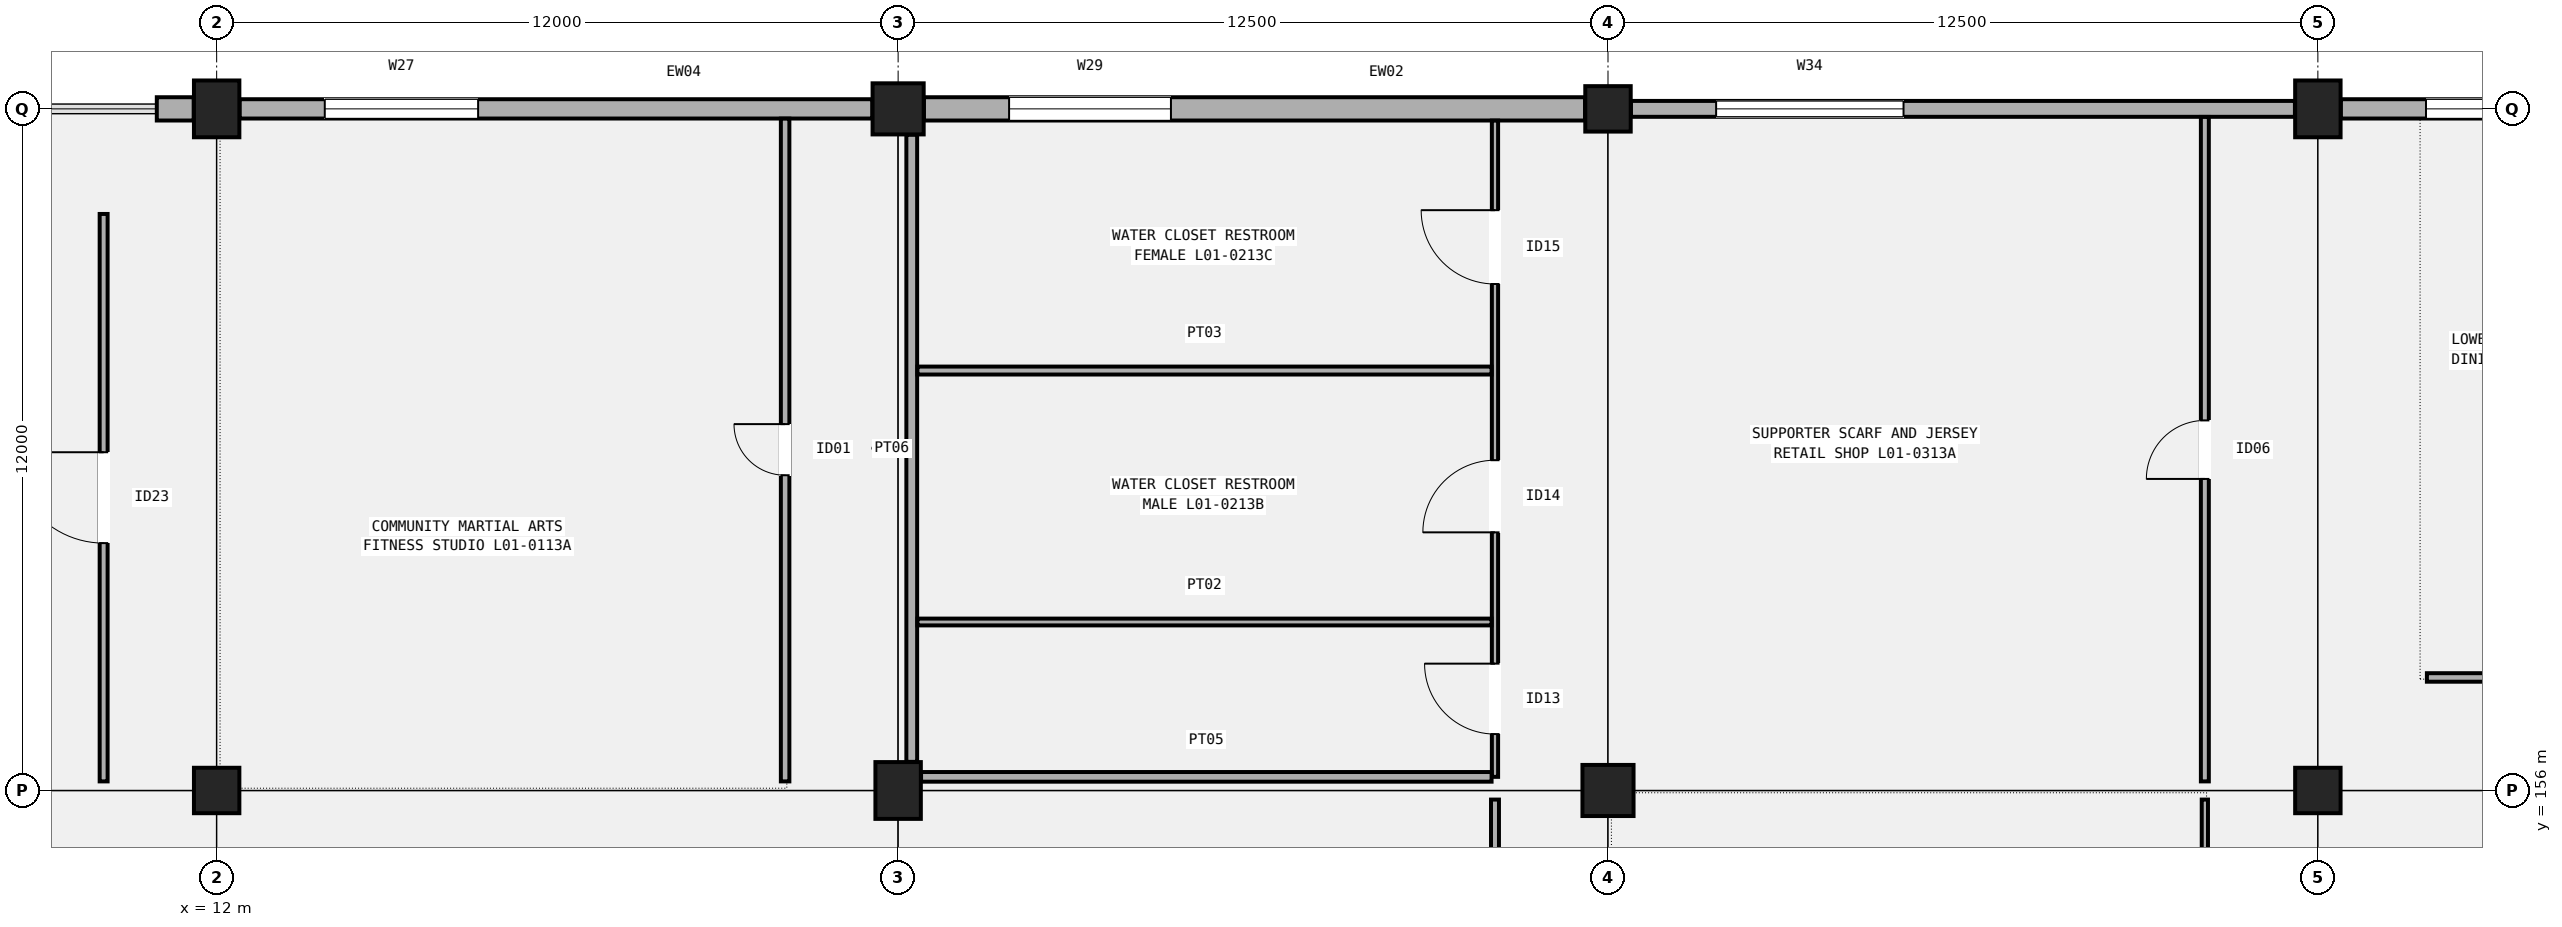
"""IFC4 building model, lengths in metres.
Left out: names, types, materials, properties, quantities, classifications, styles, units other than length and angle.
Written with IfcOpenShell. Run it as: python <this file> out.ifc"""

import sys

from ifc_helpers import new_model, si_unit, direction, frame, frame_2d, origin, origin_2d, place, context, subcontext, project, spatial, rectangle, extrude, element, fill, save


model = new_model("IFC4")
c1 = context("Model", 3, precision=1e-05, world=origin(), true_north=direction((0.0, 1.0)))
c2 = subcontext(c1, "Body", "Model", "MODEL_VIEW")
j1 = project(units=[si_unit("LENGTHUNIT", "METRE"), si_unit("PLANEANGLEUNIT", "RADIAN")], contexts=[c1])
p1 = place(None, origin())
s1 = spatial("IfcSite", under=j1, at=p1, CompositionType="ELEMENT")
p2 = place(p1, origin())
s2 = spatial("IfcBuilding", under=s1, at=p2, CompositionType="ELEMENT")
p3 = place(p2, frame((0.0, 0.0, 5.4)))
s3 = spatial("IfcBuildingStorey", under=s2, at=p3, CompositionType="ELEMENT", Elevation=5.4)
p4 = place(p3, frame((12.0, 156.0, 0.0), z_axis=(0.0, 0.0, 1.0), x_axis=(1.0, 0.0, 0.0)))
e1 = element("IfcColumn", 1, at=p4, inside=s3, PredefinedType="COLUMN", context=c2, shape_type="SweptSolid", body=[
    extrude(rectangle(XDim=0.8, YDim=0.8, at=origin_2d()), origin(), (0.0, 0.0, 1.0), 4.8),
])
for number, where, z_axis, x_axis in (
    (2, (12.0, 168.0, 0.0), (0.0, 0.0, 1.0), (1.0, 0.0, 0.0)),
    (3, (24.0, 156.0, 0.0), (0.0, 0.0, 1.0), (1.0, 0.0, 0.0)),
):
    element("IfcColumn", number, at=place(p3, frame(where, z_axis=z_axis, x_axis=x_axis)), inside=s3, PredefinedType="COLUMN", context=c2, shape_type="SweptSolid", body=[
        extrude(rectangle(XDim=0.8, YDim=1.0, at=origin_2d()), origin(), (0.0, 0.0, 1.0), 4.8),
    ])
for number, where, z_axis, x_axis in (
    (4, (24.0, 168.0, 0.0), (0.0, 0.0, 1.0), (1.0, 0.0, 0.0)),
    (5, (36.5, 156.0, 0.0), (0.0, 0.0, 1.0), (1.0, 0.0, 0.0)),
):
    element("IfcColumn", number, at=place(p3, frame(where, z_axis=z_axis, x_axis=x_axis)), inside=s3, PredefinedType="COLUMN", context=c2, shape_type="SweptSolid", body=[
        extrude(rectangle(XDim=0.9, YDim=0.9, at=origin_2d()), origin(), (0.0, 0.0, 1.0), 4.8),
    ])
for number, where, z_axis, x_axis in (
    (6, (36.5, 168.0, 0.0), (0.0, 0.0, 1.0), (1.0, 0.0, 0.0)),
    (7, (49.0, 156.0, 0.0), (0.0, 0.0, 1.0), (1.0, 0.0, 0.0)),
):
    element("IfcColumn", number, at=place(p3, frame(where, z_axis=z_axis, x_axis=x_axis)), inside=s3, PredefinedType="COLUMN", context=c2, shape_type="SweptSolid", body=[
        extrude(rectangle(XDim=0.8, YDim=0.8, at=origin_2d()), origin(), (0.0, 0.0, 1.0), 4.8),
    ])
p5 = place(p3, frame((49.0, 168.0, 0.0), z_axis=(0.0, 0.0, 1.0), x_axis=(1.0, 0.0, 0.0)))
e8 = element("IfcColumn", 8, at=p5, inside=s3, PredefinedType="COLUMN", context=c2, shape_type="SweptSolid", body=[
    extrude(rectangle(XDim=0.8, YDim=1.0, at=origin_2d()), origin(), (0.0, 0.0, 1.0), 4.8),
])
p6 = place(p3, frame((10.946, 168.0, 0.0), z_axis=(0.0, 0.0, 1.0), x_axis=(1.0, 0.0, 0.0)))
e9 = element("IfcWall", 9, at=p6, inside=s3, PredefinedType="SOLIDWALL", context=c2, shape_type="SweptSolid", body=[
    extrude(rectangle(XDim=0.65, YDim=0.41, at=frame_2d((0.325, 0.0))), origin(), (0.0, 0.0, 1.0), 4.15),
])
p7 = place(p3, frame((12.404, 168.0, 0.0), z_axis=(0.0, 0.0, 1.0), x_axis=(1.0, 0.0, 0.0)))
e10 = element("IfcWall", 10, at=p7, inside=s3, PredefinedType="SOLIDWALL", context=c2, shape_type="SweptSolid", body=[
    extrude(rectangle(XDim=11.142, YDim=0.34, at=frame_2d((5.571, 0.0))), origin(), (0.0, 0.0, 1.0), 4.2),
])
p8 = place(p7, frame((1.5, 0.0, 0.95)))
e11 = element("IfcOpeningElement", 11, at=p8, cuts=e10, PredefinedType="OPENING", context=c2, shape_type="SweptSolid", body=[
    extrude(rectangle(XDim=2.7, YDim=1.75, at=frame_2d((1.35, 0.875))), frame((0.0, 0.18, 0.0), z_axis=(0.0, -1.0, 0.0), x_axis=(1.0, 0.0, 0.0)), (0.0, 0.0, 1.0), 0.36),
])
p9 = place(p3, frame((24.454, 168.0, 0.0), z_axis=(0.0, 0.0, 1.0), x_axis=(1.0, 0.0, 0.0)))
e12 = element("IfcWall", 12, at=p9, inside=s3, PredefinedType="SOLIDWALL", context=c2, shape_type="SweptSolid", body=[
    extrude(rectangle(XDim=11.642, YDim=0.41, at=frame_2d((5.821, 0.0))), origin(), (0.0, 0.0, 1.0), 4.15),
])
p10 = place(p9, frame((1.5, 0.0, 0.95)))
e13 = element("IfcOpeningElement", 13, at=p10, cuts=e12, PredefinedType="OPENING", context=c2, shape_type="SweptSolid", body=[
    extrude(rectangle(XDim=2.85, YDim=2.0, at=frame_2d((1.425, 1.0))), frame((0.0, 0.215, 0.0), z_axis=(0.0, -1.0, 0.0), x_axis=(1.0, 0.0, 0.0)), (0.0, 0.0, 1.0), 0.43),
])
p11 = place(p3, frame((36.904, 168.0, 0.0), z_axis=(0.0, 0.0, 1.0), x_axis=(1.0, 0.0, 0.0)))
e14 = element("IfcWall", 14, at=p11, inside=s3, PredefinedType="SOLIDWALL", context=c2, shape_type="SweptSolid", body=[
    extrude(rectangle(XDim=11.692, YDim=0.28, at=frame_2d((5.846, 0.0))), origin(), (0.0, 0.0, 1.0), 4.2),
])
p12 = place(p11, frame((1.5, 0.0, 0.95)))
e15 = element("IfcOpeningElement", 15, at=p12, cuts=e14, PredefinedType="OPENING", context=c2, shape_type="SweptSolid", body=[
    extrude(rectangle(XDim=3.3, YDim=2.25, at=frame_2d((1.65, 1.125))), frame((0.0, 0.15, 0.0), z_axis=(0.0, -1.0, 0.0), x_axis=(1.0, 0.0, 0.0)), (0.0, 0.0, 1.0), 0.3),
])
p13 = place(p3, frame((49.404, 168.0, 0.0), z_axis=(0.0, 0.0, 1.0), x_axis=(1.0, 0.0, 0.0)))
e16 = element("IfcWall", 16, at=p13, inside=s3, PredefinedType="SOLIDWALL", context=c2, shape_type="SweptSolid", body=[
    extrude(rectangle(XDim=11.642, YDim=0.34, at=frame_2d((5.821, 0.0))), origin(), (0.0, 0.0, 1.0), 4.15),
])
p14 = place(p13, frame((1.5, 0.0, 0.95)))
e17 = element("IfcOpeningElement", 17, at=p14, cuts=e16, PredefinedType="OPENING", context=c2, shape_type="SweptSolid", body=[
    extrude(rectangle(XDim=3.6, YDim=2.15, at=frame_2d((1.8, 1.075))), frame((0.0, 0.18, 0.0), z_axis=(0.0, -1.0, 0.0), x_axis=(1.0, 0.0, 0.0)), (0.0, 0.0, 1.0), 0.36),
])
p15 = place(p3, frame((10.01, 156.16, 0.0), z_axis=(0.0, 0.0, 1.0), x_axis=(0.0, 1.0, 0.0)))
e18 = element("IfcWall", 18, at=p15, inside=s3, PredefinedType="PARTITIONING", context=c2, shape_type="SweptSolid", body=[
    extrude(rectangle(XDim=9.99, YDim=0.14, at=frame_2d((4.995, 0.0))), origin(), (0.0, 0.0, 1.0), 3.92),
])
p16 = place(p15, frame((4.195, 0.0, 0.0)))
e19 = element("IfcOpeningElement", 19, at=p16, cuts=e18, PredefinedType="OPENING", context=c2, shape_type="SweptSolid", body=[
    extrude(rectangle(XDim=1.6, YDim=2.3, at=frame_2d((0.8, 1.15))), frame((0.0, 0.08, 0.0), z_axis=(0.0, -1.0, 0.0), x_axis=(1.0, 0.0, 0.0)), (0.0, 0.0, 1.0), 0.16),
])
p17 = place(p3, frame((22.01, 156.16, 0.0), z_axis=(0.0, 0.0, 1.0), x_axis=(0.0, 1.0, 0.0)))
e20 = element("IfcWall", 20, at=p17, inside=s3, PredefinedType="PARTITIONING", context=c2, shape_type="SweptSolid", body=[
    extrude(rectangle(XDim=11.668, YDim=0.15, at=frame_2d((5.834, 0.0))), origin(), (0.0, 0.0, 1.0), 3.92),
])
p18 = place(p17, frame((5.39, 0.0, 0.0)))
e21 = element("IfcOpeningElement", 21, at=p18, cuts=e20, PredefinedType="OPENING", context=c2, shape_type="SweptSolid", body=[
    extrude(rectangle(XDim=0.9, YDim=2.06, at=frame_2d((0.45, 1.03))), frame((0.0, 0.085, 0.0), z_axis=(0.0, -1.0, 0.0), x_axis=(1.0, 0.0, 0.0)), (0.0, 0.0, 1.0), 0.17),
])
p19 = place(p3, frame((34.51, 145.92, 0.0), z_axis=(0.0, 0.0, 1.0), x_axis=(0.0, 1.0, 0.0)))
e22 = element("IfcWall", 22, at=p19, inside=s3, PredefinedType="PARTITIONING", context=c2, shape_type="SweptSolid", body=[
    extrude(rectangle(XDim=9.92, YDim=0.14, at=frame_2d((4.96, 0.0))), origin(), (0.0, 0.0, 1.0), 3.92),
])
p20 = place(p19, frame((4.355, 0.0, 0.0)))
e23 = element("IfcOpeningElement", 23, at=p20, cuts=e22, PredefinedType="OPENING", context=c2, shape_type="SweptSolid", body=[
    extrude(rectangle(XDim=1.21, YDim=2.18, at=frame_2d((0.605, 1.09))), frame((0.0, 0.08, 0.0), z_axis=(0.0, -1.0, 0.0), x_axis=(1.0, 0.0, 0.0)), (0.0, 0.0, 1.0), 0.16),
])
p21 = place(p3, frame((34.51, 156.24, 0.0), z_axis=(0.0, 0.0, 1.0), x_axis=(0.0, 1.0, 0.0)))
e24 = element("IfcWall", 24, at=p21, inside=s3, PredefinedType="PARTITIONING", context=c2, shape_type="SweptSolid", body=[
    extrude(rectangle(XDim=11.553, YDim=0.11, at=frame_2d((5.776, 0.0))), origin(), (0.0, 0.0, 1.0), 3.92),
])
p22 = place(p21, frame((0.753, 0.0, 0.0)))
e25 = element("IfcOpeningElement", 25, at=p22, cuts=e24, PredefinedType="OPENING", context=c2, shape_type="SweptSolid", body=[
    extrude(rectangle(XDim=1.24, YDim=2.22, at=frame_2d((0.62, 1.11))), frame((0.0, 0.065, 0.0), z_axis=(0.0, -1.0, 0.0), x_axis=(1.0, 0.0, 0.0)), (0.0, 0.0, 1.0), 0.13),
])
p23 = place(p21, frame((4.305, 0.0, 0.0)))
e26 = element("IfcOpeningElement", 26, at=p23, cuts=e24, PredefinedType="OPENING", context=c2, shape_type="SweptSolid", body=[
    extrude(rectangle(XDim=1.27, YDim=2.2, at=frame_2d((0.635, 1.1))), frame((0.0, 0.065, 0.0), z_axis=(0.0, -1.0, 0.0), x_axis=(1.0, 0.0, 0.0)), (0.0, 0.0, 1.0), 0.13),
])
p24 = place(p21, frame((8.677, 0.0, 0.0)))
e27 = element("IfcOpeningElement", 27, at=p24, cuts=e24, PredefinedType="OPENING", context=c2, shape_type="SweptSolid", body=[
    extrude(rectangle(XDim=1.3, YDim=2.24, at=frame_2d((0.65, 1.12))), frame((0.0, 0.065, 0.0), z_axis=(0.0, -1.0, 0.0), x_axis=(1.0, 0.0, 0.0)), (0.0, 0.0, 1.0), 0.13),
])
p25 = place(p3, frame((24.404, 156.24, 0.0), z_axis=(0.0, 0.0, 1.0), x_axis=(1.0, 0.0, 0.0)))
e28 = element("IfcWall", 28, at=p25, inside=s3, PredefinedType="PARTITIONING", context=c2, shape_type="SweptSolid", body=[
    extrude(rectangle(XDim=10.046, YDim=0.17, at=frame_2d((5.023, 0.0))), origin(), (0.0, 0.0, 1.0), 3.71),
])
p26 = place(p3, frame((24.24, 156.504, 0.0), z_axis=(0.0, 0.0, 1.0), x_axis=(0.0, 1.0, 0.0)))
e29 = element("IfcWall", 29, at=p26, inside=s3, PredefinedType="PARTITIONING", context=c2, shape_type="SweptSolid", body=[
    extrude(rectangle(XDim=11.042, YDim=0.19, at=frame_2d((5.521, 0.0))), origin(), (0.0, 0.0, 1.0), 3.71),
])
p27 = place(p3, frame((24.34, 158.966, 0.0), z_axis=(0.0, 0.0, 1.0), x_axis=(1.0, 0.0, 0.0)))
e30 = element("IfcWall", 30, at=p27, inside=s3, PredefinedType="PARTITIONING", context=c2, shape_type="SweptSolid", body=[
    extrude(rectangle(XDim=10.11, YDim=0.12, at=frame_2d((5.055, 0.0))), origin(), (0.0, 0.0, 1.0), 3.92),
])
p28 = place(p3, frame((24.34, 163.393, 0.0), z_axis=(0.0, 0.0, 1.0), x_axis=(1.0, 0.0, 0.0)))
e31 = element("IfcWall", 31, at=p28, inside=s3, PredefinedType="PARTITIONING", context=c2, shape_type="SweptSolid", body=[
    extrude(rectangle(XDim=10.11, YDim=0.14, at=frame_2d((5.055, 0.0))), origin(), (0.0, 0.0, 1.0), 3.92),
])
p29 = place(p3, frame((47.01, 145.92, 0.0), z_axis=(0.0, 0.0, 1.0), x_axis=(0.0, 1.0, 0.0)))
e32 = element("IfcWall", 32, at=p29, inside=s3, PredefinedType="PARTITIONING", context=c2, shape_type="SweptSolid", body=[
    extrude(rectangle(XDim=9.92, YDim=0.11, at=frame_2d((4.96, 0.0))), origin(), (0.0, 0.0, 1.0), 3.92),
])
p30 = place(p29, frame((4.46, 0.0, 0.0)))
e33 = element("IfcOpeningElement", 33, at=p30, cuts=e32, PredefinedType="OPENING", context=c2, shape_type="SweptSolid", body=[
    extrude(rectangle(XDim=1.0, YDim=2.14, at=frame_2d((0.5, 1.07))), frame((0.0, 0.065, 0.0), z_axis=(0.0, -1.0, 0.0), x_axis=(1.0, 0.0, 0.0)), (0.0, 0.0, 1.0), 0.13),
])
p31 = place(p3, frame((47.01, 156.16, 0.0), z_axis=(0.0, 0.0, 1.0), x_axis=(0.0, 1.0, 0.0)))
e34 = element("IfcWall", 34, at=p31, inside=s3, PredefinedType="PARTITIONING", context=c2, shape_type="SweptSolid", body=[
    extrude(rectangle(XDim=11.698, YDim=0.14, at=frame_2d((5.849, 0.0))), origin(), (0.0, 0.0, 1.0), 3.92),
])
p32 = place(p31, frame((5.325, 0.0, 0.0)))
e35 = element("IfcOpeningElement", 35, at=p32, cuts=e34, PredefinedType="OPENING", context=c2, shape_type="SweptSolid", body=[
    extrude(rectangle(XDim=1.03, YDim=2.12, at=frame_2d((0.515, 1.06))), frame((0.0, 0.08, 0.0), z_axis=(0.0, -1.0, 0.0), x_axis=(1.0, 0.0, 0.0)), (0.0, 0.0, 1.0), 0.16),
])
p33 = place(p3, frame((50.92, 157.99, 0.0), z_axis=(0.0, 0.0, 1.0), x_axis=(1.0, 0.0, 0.0)))
e36 = element("IfcWall", 36, at=p33, inside=s3, PredefinedType="PARTITIONING", context=c2, shape_type="SweptSolid", body=[
    extrude(rectangle(XDim=10.42, YDim=0.15, at=frame_2d((5.21, 0.0))), origin(), (0.0, 0.0, 1.0), 3.92),
])
p34 = place(p33, frame((4.62, 0.0, 0.0)))
e37 = element("IfcOpeningElement", 37, at=p34, cuts=e36, PredefinedType="OPENING", context=c2, shape_type="SweptSolid", body=[
    extrude(rectangle(XDim=1.18, YDim=2.2, at=frame_2d((0.59, 1.1))), frame((0.0, 0.085, 0.0), z_axis=(0.0, -1.0, 0.0), x_axis=(1.0, 0.0, 0.0)), (0.0, 0.0, 1.0), 0.17),
])
p35 = place(p8, origin())
e38 = element("IfcWindow", 38, at=p35, inside=s3, PartitioningType="SINGLE_PANEL", PredefinedType="WINDOW", context=c2, shape_type="SweptSolid", body=[
    extrude(rectangle(XDim=2.7, YDim=1.75, at=frame_2d((1.35, 0.875))), frame((0.0, 0.03, 0.0), z_axis=(0.0, -1.0, 0.0), x_axis=(1.0, 0.0, 0.0)), (0.0, 0.0, 1.0), 0.06),
])
fill(e11, e38)
p36 = place(p10, origin())
e39 = element("IfcWindow", 39, at=p36, inside=s3, PartitioningType="SINGLE_PANEL", PredefinedType="WINDOW", context=c2, shape_type="SweptSolid", body=[
    extrude(rectangle(XDim=2.85, YDim=2.0, at=frame_2d((1.425, 1.0))), frame((0.0, 0.03, 0.0), z_axis=(0.0, -1.0, 0.0), x_axis=(1.0, 0.0, 0.0)), (0.0, 0.0, 1.0), 0.06),
])
fill(e13, e39)
p37 = place(p12, origin())
e40 = element("IfcWindow", 40, at=p37, inside=s3, PartitioningType="SINGLE_PANEL", PredefinedType="WINDOW", context=c2, shape_type="SweptSolid", body=[
    extrude(rectangle(XDim=3.3, YDim=2.25, at=frame_2d((1.65, 1.125))), frame((0.0, 0.03, 0.0), z_axis=(0.0, -1.0, 0.0), x_axis=(1.0, 0.0, 0.0)), (0.0, 0.0, 1.0), 0.06),
])
fill(e15, e40)
p38 = place(p14, origin())
e41 = element("IfcWindow", 41, at=p38, inside=s3, PartitioningType="SINGLE_PANEL", PredefinedType="WINDOW", context=c2, shape_type="SweptSolid", body=[
    extrude(rectangle(XDim=3.6, YDim=2.15, at=frame_2d((1.8, 1.075))), frame((0.0, 0.03, 0.0), z_axis=(0.0, -1.0, 0.0), x_axis=(1.0, 0.0, 0.0)), (0.0, 0.0, 1.0), 0.06),
])
fill(e17, e41)
p39 = place(p16, origin())
e42 = element("IfcDoor", 42, at=p39, inside=s3, OperationType="SINGLE_SWING_RIGHT", PredefinedType="DOOR", context=c2, shape_type="SweptSolid", body=[
    extrude(rectangle(XDim=1.6, YDim=2.3, at=frame_2d((0.8, 1.15))), frame((0.0, 0.025, 0.0), z_axis=(0.0, -1.0, 0.0), x_axis=(1.0, 0.0, 0.0)), (0.0, 0.0, 1.0), 0.05),
])
fill(e19, e42)
p40 = place(p18, origin())
e43 = element("IfcDoor", 43, at=p40, inside=s3, OperationType="SINGLE_SWING_RIGHT", PredefinedType="DOOR", context=c2, shape_type="SweptSolid", body=[
    extrude(rectangle(XDim=0.9, YDim=2.06, at=frame_2d((0.45, 1.03))), frame((0.0, 0.025, 0.0), z_axis=(0.0, -1.0, 0.0), x_axis=(1.0, 0.0, 0.0)), (0.0, 0.0, 1.0), 0.05),
])
fill(e21, e43)
p41 = place(p22, origin())
e44 = element("IfcDoor", 44, at=p41, inside=s3, OperationType="SINGLE_SWING_RIGHT", PredefinedType="DOOR", context=c2, shape_type="SweptSolid", body=[
    extrude(rectangle(XDim=1.24, YDim=2.22, at=frame_2d((0.62, 1.11))), frame((0.0, 0.025, 0.0), z_axis=(0.0, -1.0, 0.0), x_axis=(1.0, 0.0, 0.0)), (0.0, 0.0, 1.0), 0.05),
])
fill(e25, e44)
p42 = place(p23, origin())
e45 = element("IfcDoor", 45, at=p42, inside=s3, OperationType="SINGLE_SWING_LEFT", PredefinedType="DOOR", context=c2, shape_type="SweptSolid", body=[
    extrude(rectangle(XDim=1.27, YDim=2.2, at=frame_2d((0.635, 1.1))), frame((0.0, 0.025, 0.0), z_axis=(0.0, -1.0, 0.0), x_axis=(1.0, 0.0, 0.0)), (0.0, 0.0, 1.0), 0.05),
])
fill(e26, e45)
p43 = place(p24, origin())
e46 = element("IfcDoor", 46, at=p43, inside=s3, OperationType="SINGLE_SWING_RIGHT", PredefinedType="DOOR", context=c2, shape_type="SweptSolid", body=[
    extrude(rectangle(XDim=1.3, YDim=2.24, at=frame_2d((0.65, 1.12))), frame((0.0, 0.025, 0.0), z_axis=(0.0, -1.0, 0.0), x_axis=(1.0, 0.0, 0.0)), (0.0, 0.0, 1.0), 0.05),
])
fill(e27, e46)
p44 = place(p32, origin())
e47 = element("IfcDoor", 47, at=p44, inside=s3, OperationType="SINGLE_SWING_LEFT", PredefinedType="DOOR", context=c2, shape_type="SweptSolid", body=[
    extrude(rectangle(XDim=1.03, YDim=2.12, at=frame_2d((0.515, 1.06))), frame((0.0, 0.025, 0.0), z_axis=(0.0, -1.0, 0.0), x_axis=(1.0, 0.0, 0.0)), (0.0, 0.0, 1.0), 0.05),
])
fill(e35, e47)
save(model, sys.argv[1])
